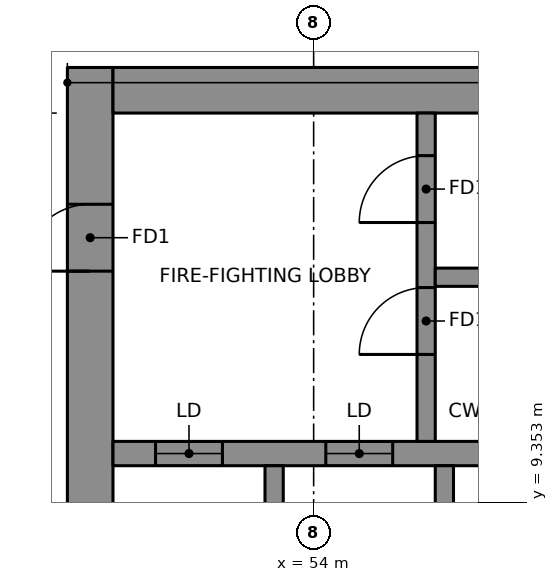
"""IFC4 building model, lengths in metres.
Left out: names, types, materials, properties, quantities, classifications, styles, units other than length and angle.
Written with IfcOpenShell. Run it as: python <this file> out.ifc"""

import sys

from ifc_helpers import new_model, si_unit, direction, frame, frame_2d, origin, place, context, subcontext, project, spatial, rectangle, extrude, element, fill, save


model = new_model("IFC4")
c1 = context("Model", 3, precision=1e-05, world=origin(), true_north=direction((0.0, 1.0)))
c2 = subcontext(c1, "Body", "Model", "MODEL_VIEW")
j1 = project(units=[si_unit("LENGTHUNIT", "METRE"), si_unit("PLANEANGLEUNIT", "RADIAN")], contexts=[c1])
p1 = place(None, origin())
s1 = spatial("IfcSite", under=j1, at=p1, CompositionType="ELEMENT")
p2 = place(p1, origin())
s2 = spatial("IfcBuilding", under=s1, at=p2, CompositionType="ELEMENT")
p3 = place(p2, frame((0.0, 0.0, 179.05)))
s3 = spatial("IfcBuildingStorey", under=s2, at=p3, CompositionType="ELEMENT", Elevation=179.05)
p4 = place(p3, frame((50.325, 6.65, 0.0), z_axis=(0.0, 0.0, 1.0), x_axis=(0.0, 1.0, 0.0)))
e1 = element("IfcWall", 1, at=p4, inside=s3, PredefinedType="SHEAR", context=c2, shape_type="SweptSolid", body=[
    extrude(rectangle(XDim=9.85, YDim=0.75, at=frame_2d((4.925, 0.0))), origin(), (0.0, 0.0, 1.0), 3.55),
])
p5 = place(p4, frame((6.5, 0.0, 0.0)))
e2 = element("IfcOpeningElement", 2, at=p5, cuts=e1, PredefinedType="OPENING", context=c2, shape_type="SweptSolid", body=[
    extrude(rectangle(XDim=1.1, YDim=2.1, at=frame_2d((0.55, 1.05))), frame((0.0, 0.385, 0.0), z_axis=(0.0, -1.0, 0.0), x_axis=(1.0, 0.0, 0.0)), (0.0, 0.0, 1.0), 0.77),
])
p6 = place(p3, frame((50.7, 16.125, 0.0), z_axis=(0.0, 0.0, 1.0), x_axis=(1.0, 0.0, 0.0)))
e3 = element("IfcWall", 3, at=p6, inside=s3, PredefinedType="SHEAR", context=c2, shape_type="SweptSolid", body=[
    extrude(rectangle(XDim=13.77, YDim=0.75, at=frame_2d((6.885, 0.0))), origin(), (0.0, 0.0, 1.0), 3.55),
])
p7 = place(p3, frame((50.7, 10.15, 0.0), z_axis=(0.0, 0.0, 1.0), x_axis=(1.0, 0.0, 0.0)))
e4 = element("IfcWall", 4, at=p7, inside=s3, PredefinedType="SHEAR", context=c2, shape_type="SweptSolid", body=[
    extrude(rectangle(XDim=13.02, YDim=0.4, at=frame_2d((6.51, 0.0))), origin(), (0.0, 0.0, 1.0), 3.55),
])
p8 = place(p7, frame((0.7, 0.0, 0.0)))
e5 = element("IfcOpeningElement", 5, at=p8, cuts=e4, PredefinedType="OPENING", context=c2, shape_type="SweptSolid", body=[
    extrude(rectangle(XDim=1.1, YDim=2.1, at=frame_2d((0.55, 1.05))), frame((0.0, 0.21, 0.0), z_axis=(0.0, -1.0, 0.0), x_axis=(1.0, 0.0, 0.0)), (0.0, 0.0, 1.0), 0.42),
])
p9 = place(p7, frame((3.5, 0.0, 0.0)))
e6 = element("IfcOpeningElement", 6, at=p9, cuts=e4, PredefinedType="OPENING", context=c2, shape_type="SweptSolid", body=[
    extrude(rectangle(XDim=1.1, YDim=2.1, at=frame_2d((0.55, 1.05))), frame((0.0, 0.21, 0.0), z_axis=(0.0, -1.0, 0.0), x_axis=(1.0, 0.0, 0.0)), (0.0, 0.0, 1.0), 0.42),
])
for number, where, z_axis, x_axis in (
    (7, (53.35, 6.95, 0.0), (0.0, 0.0, 1.0), (0.0, 1.0, 0.0)),
    (8, (56.15, 6.95, 0.0), (0.0, 0.0, 1.0), (0.0, 1.0, 0.0)),
):
    element("IfcWall", number, at=place(p3, frame(where, z_axis=z_axis, x_axis=x_axis)), inside=s3, PredefinedType="SHEAR", context=c2, shape_type="SweptSolid", body=[
        extrude(rectangle(XDim=3.0, YDim=0.3, at=frame_2d((1.5, 0.0))), origin(), (0.0, 0.0, 1.0), 3.55),
    ])
p10 = place(p3, frame((55.85, 10.35, 0.0), z_axis=(0.0, 0.0, 1.0), x_axis=(0.0, 1.0, 0.0)))
e9 = element("IfcWall", 9, at=p10, inside=s3, PredefinedType="SHEAR", context=c2, shape_type="SweptSolid", body=[
    extrude(rectangle(XDim=5.4, YDim=0.3, at=frame_2d((2.7, 0.0))), origin(), (0.0, 0.0, 1.0), 3.55),
])
p11 = place(p10, frame((1.43, 0.0, 0.0)))
e10 = element("IfcOpeningElement", 10, at=p11, cuts=e9, PredefinedType="OPENING", context=c2, shape_type="SweptSolid", body=[
    extrude(rectangle(XDim=1.1, YDim=2.1, at=frame_2d((0.55, 1.05))), frame((0.0, 0.16, 0.0), z_axis=(0.0, -1.0, 0.0), x_axis=(1.0, 0.0, 0.0)), (0.0, 0.0, 1.0), 0.32),
])
p12 = place(p10, frame((3.6, 0.0, 0.0)))
e11 = element("IfcOpeningElement", 11, at=p12, cuts=e9, PredefinedType="OPENING", context=c2, shape_type="SweptSolid", body=[
    extrude(rectangle(XDim=1.1, YDim=2.1, at=frame_2d((0.55, 1.05))), frame((0.0, 0.16, 0.0), z_axis=(0.0, -1.0, 0.0), x_axis=(1.0, 0.0, 0.0)), (0.0, 0.0, 1.0), 0.32),
])
p13 = place(p3, frame((56.0, 13.05, 0.0), z_axis=(0.0, 0.0, 1.0), x_axis=(1.0, 0.0, 0.0)))
e12 = element("IfcWall", 12, at=p13, inside=s3, PredefinedType="SHEAR", context=c2, shape_type="SweptSolid", body=[
    extrude(rectangle(XDim=7.72, YDim=0.3, at=frame_2d((3.86, 0.0))), origin(), (0.0, 0.0, 1.0), 3.55),
])
p14 = place(p8, origin())
e13 = element("IfcDoor", 13, at=p14, inside=s3, OperationType="DOUBLE_DOOR_SLIDING", PredefinedType="DOOR", context=c2, shape_type="SweptSolid", body=[
    extrude(rectangle(XDim=1.1, YDim=2.1, at=frame_2d((0.55, 1.05))), frame((0.0, 0.025, 0.0), z_axis=(0.0, -1.0, 0.0), x_axis=(1.0, 0.0, 0.0)), (0.0, 0.0, 1.0), 0.05),
])
fill(e5, e13)
p15 = place(p9, origin())
e14 = element("IfcDoor", 14, at=p15, inside=s3, OperationType="DOUBLE_DOOR_SLIDING", PredefinedType="DOOR", context=c2, shape_type="SweptSolid", body=[
    extrude(rectangle(XDim=1.1, YDim=2.1, at=frame_2d((0.55, 1.05))), frame((0.0, 0.025, 0.0), z_axis=(0.0, -1.0, 0.0), x_axis=(1.0, 0.0, 0.0)), (0.0, 0.0, 1.0), 0.05),
])
fill(e6, e14)
p16 = place(p11, origin())
e15 = element("IfcDoor", 15, at=p16, inside=s3, OperationType="SINGLE_SWING_RIGHT", PredefinedType="DOOR", context=c2, shape_type="SweptSolid", body=[
    extrude(rectangle(XDim=1.1, YDim=2.1, at=frame_2d((0.55, 1.05))), frame((0.0, 0.025, 0.0), z_axis=(0.0, -1.0, 0.0), x_axis=(1.0, 0.0, 0.0)), (0.0, 0.0, 1.0), 0.05),
])
fill(e10, e15)
p17 = place(p12, origin())
e16 = element("IfcDoor", 16, at=p17, inside=s3, OperationType="SINGLE_SWING_RIGHT", PredefinedType="DOOR", context=c2, shape_type="SweptSolid", body=[
    extrude(rectangle(XDim=1.1, YDim=2.1, at=frame_2d((0.55, 1.05))), frame((0.0, 0.025, 0.0), z_axis=(0.0, -1.0, 0.0), x_axis=(1.0, 0.0, 0.0)), (0.0, 0.0, 1.0), 0.05),
])
fill(e11, e16)
p18 = place(p5, origin())
e17 = element("IfcDoor", 17, at=p18, inside=s3, OperationType="SINGLE_SWING_RIGHT", PredefinedType="DOOR", context=c2, shape_type="SweptSolid", body=[
    extrude(rectangle(XDim=1.1, YDim=2.1, at=frame_2d((0.55, 1.05))), frame((0.0, 0.025, 0.0), z_axis=(0.0, -1.0, 0.0), x_axis=(1.0, 0.0, 0.0)), (0.0, 0.0, 1.0), 0.05),
])
fill(e2, e17)
save(model, sys.argv[1])
